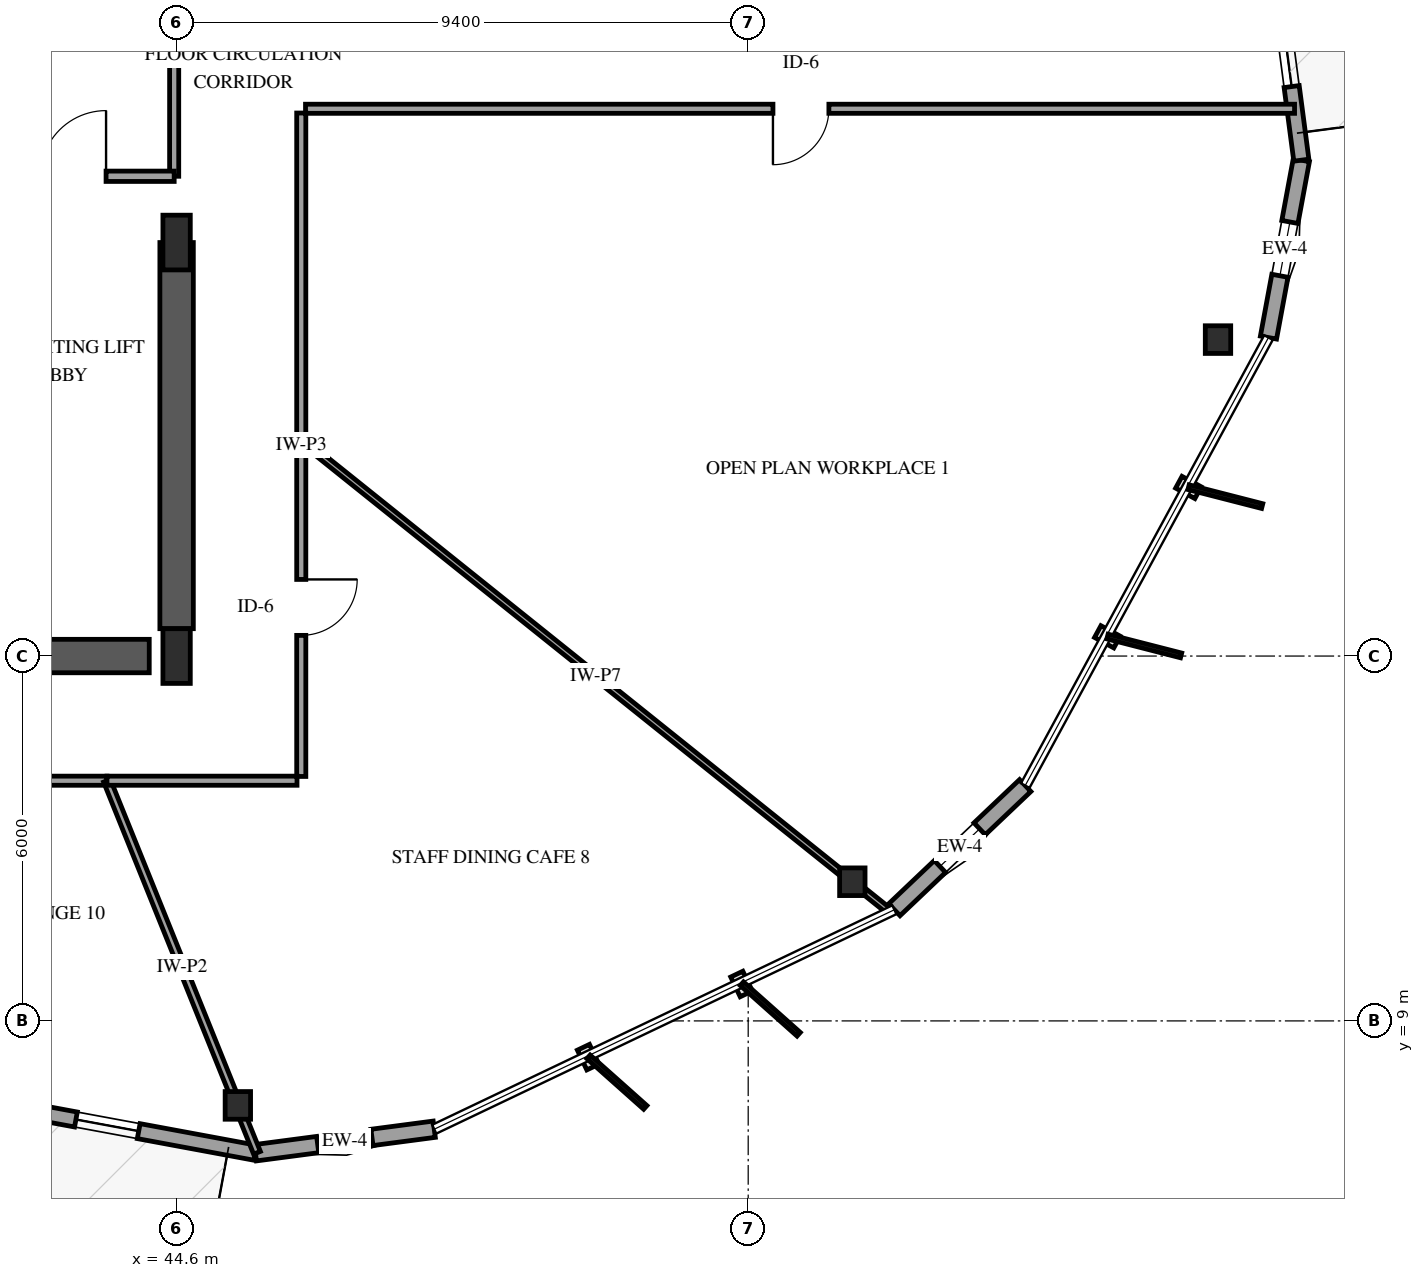
"""IFC4 building model, lengths in metres.
Left out: names, types, materials, properties, quantities, classifications, styles, units other than length and angle.
Written with IfcOpenShell. Run it as: python <this file> out.ifc"""

import sys

from ifc_helpers import new_model, si_unit, direction, frame, frame_2d, origin, origin_2d, place, context, subcontext, project, spatial, rectangle, i_section, extrude, element, fill, save


model = new_model("IFC4")
c1 = context("Model", 3, precision=1e-05, world=origin(), true_north=direction((0.0, 1.0)))
c2 = subcontext(c1, "Body", "Model", "MODEL_VIEW")
j1 = project(units=[si_unit("LENGTHUNIT", "METRE"), si_unit("PLANEANGLEUNIT", "RADIAN")], contexts=[c1])
p1 = place(None, origin())
s1 = spatial("IfcSite", under=j1, at=p1, CompositionType="ELEMENT")
p2 = place(p1, origin())
s2 = spatial("IfcBuilding", under=s1, at=p2, CompositionType="ELEMENT")
p3 = place(p2, frame((0.0, 0.0, 126.4)))
s3 = spatial("IfcBuildingStorey", under=s2, at=p3, CompositionType="ELEMENT", Elevation=126.4)
p4 = place(p3, frame((41.3, 15.0, 0.0), z_axis=(0.0, 0.0, 1.0), x_axis=(1.0, 0.0, 0.0)))
e1 = element("IfcWall", 1, at=p4, inside=s3, PredefinedType="SHEAR", context=c2, shape_type="SweptSolid", body=[
    extrude(rectangle(XDim=2.85, YDim=0.55, at=frame_2d((1.425, 0.0))), origin(), (0.0, 0.0, 1.0), 3.9),
])
p5 = place(p3, frame((44.6, 15.45, 0.0), z_axis=(0.0, 0.0, 1.0), x_axis=(0.0, 1.0, 0.0)))
e2 = element("IfcWall", 2, at=p5, inside=s3, PredefinedType="SHEAR", context=c2, shape_type="SweptSolid", body=[
    extrude(rectangle(XDim=6.35, YDim=0.55, at=frame_2d((3.175, 0.0))), origin(), (0.0, 0.0, 1.0), 3.9),
])
for number, where, z_axis, x_axis in (
    (3, (44.6, 15.0, 0.0), (0.0, 0.0, 1.0), (1.0, 0.0, 0.0)),
    (4, (44.6, 21.8, 0.0), (0.0, 0.0, 1.0), (1.0, 0.0, 0.0)),
):
    element("IfcColumn", number, at=place(p3, frame(where, z_axis=z_axis, x_axis=x_axis)), inside=s3, PredefinedType="PILASTER", context=c2, shape_type="SweptSolid", body=[
        extrude(rectangle(XDim=0.45, YDim=0.9, at=origin_2d()), origin(), (0.0, 0.0, 1.0), 3.9),
    ])
for number, where, z_axis, x_axis in (
    (5, (45.607, 7.611, 0.0), (0.0, 0.0, 1.0), (1.0, 0.0, 0.0)),
    (6, (55.712, 11.289, 0.0), (0.0, 0.0, 1.0), (1.0, 0.0, 0.0)),
    (7, (61.726, 20.204, 0.0), (0.0, 0.0, 1.0), (1.0, 0.0, 0.0)),
):
    element("IfcColumn", number, at=place(p3, frame(where, z_axis=z_axis, x_axis=x_axis)), inside=s3, PredefinedType="COLUMN", context=c2, shape_type="SweptSolid", body=[
        extrude(i_section(OverallWidth=0.418, OverallDepth=0.455, WebThickness=0.042, FlangeThickness=0.068, FilletRadius=0.038, at=origin_2d()), origin(), (0.0, 0.0, 1.0), 3.9),
    ])
p6 = place(p3, frame((45.896, 6.832, 0.0), z_axis=(0.0, 0.0, 1.0), x_axis=(0.991434395997, 0.130605660036, 0.0)))
e8 = element("IfcWall", 8, at=p6, inside=s3, PredefinedType="SOLIDWALL", context=c2, shape_type="SweptSolid", body=[
    extrude(rectangle(XDim=2.967, YDim=0.27, at=frame_2d((1.483, 0.0))), origin(), (0.0, 0.0, 1.0), 2.979),
])
p7 = place(p6, frame((1.033, 0.0, 0.75)))
e9 = element("IfcOpeningElement", 9, at=p7, cuts=e8, PredefinedType="OPENING", context=c2, shape_type="SweptSolid", body=[
    extrude(rectangle(XDim=0.9, YDim=1.5, at=frame_2d((0.45, 0.75))), frame((0.0, 0.145, 0.0), z_axis=(0.0, -1.0, 0.0), x_axis=(1.0, 0.0, 0.0)), (0.0, 0.0, 1.0), 0.29),
])
p8 = place(p3, frame((37.653, 8.359, 0.0), z_axis=(0.0, 0.0, 1.0), x_axis=(0.983253798772, -0.182241507899, 0.0)))
e10 = element("IfcWall", 10, at=p8, inside=s3, PredefinedType="SOLIDWALL", context=c2, shape_type="SweptSolid", body=[
    extrude(rectangle(XDim=8.384, YDim=0.25, at=frame_2d((4.192, 0.0))), origin(), (0.0, 0.0, 1.0), 2.979),
])
p9 = place(p8, frame((3.692, 0.0, 0.0)))
e11 = element("IfcOpeningElement", 11, at=p9, cuts=e10, PredefinedType="OPENING", context=c2, shape_type="SweptSolid", body=[
    extrude(rectangle(XDim=1.05, YDim=2.15, at=frame_2d((0.525, 1.075))), frame((0.0, 0.135, 0.0), z_axis=(0.0, -1.0, 0.0), x_axis=(1.0, 0.0, 0.0)), (0.0, 0.0, 1.0), 0.27),
])
p10 = place(p8, frame((0.44, 0.0, 0.72)))
e12 = element("IfcOpeningElement", 12, at=p10, cuts=e10, PredefinedType="OPENING", context=c2, shape_type="SweptSolid", body=[
    extrude(rectangle(XDim=1.05, YDim=1.55, at=frame_2d((0.525, 0.775))), frame((0.0, 0.135, 0.0), z_axis=(0.0, -1.0, 0.0), x_axis=(1.0, 0.0, 0.0)), (0.0, 0.0, 1.0), 0.27),
])
p11 = place(p8, frame((5.382, 0.0, 0.72)))
e13 = element("IfcOpeningElement", 13, at=p11, cuts=e10, PredefinedType="OPENING", context=c2, shape_type="SweptSolid", body=[
    extrude(rectangle(XDim=1.05, YDim=1.55, at=frame_2d((0.525, 0.775))), frame((0.0, 0.135, 0.0), z_axis=(0.0, -1.0, 0.0), x_axis=(1.0, 0.0, 0.0)), (0.0, 0.0, 1.0), 0.27),
])
p12 = place(p3, frame((56.404, 10.828, 0.0), z_axis=(0.0, 0.0, 1.0), x_axis=(0.725340416539, 0.688390354476, 0.0)))
e14 = element("IfcWall", 14, at=p12, inside=s3, PredefinedType="SOLIDWALL", context=c2, shape_type="SweptSolid", body=[
    extrude(rectangle(XDim=2.967, YDim=0.27, at=frame_2d((1.483, 0.0))), origin(), (0.0, 0.0, 1.0), 2.979),
])
p13 = place(p12, frame((1.033, 0.0, 0.75)))
e15 = element("IfcOpeningElement", 15, at=p13, cuts=e14, PredefinedType="OPENING", context=c2, shape_type="SweptSolid", body=[
    extrude(rectangle(XDim=0.9, YDim=1.5, at=frame_2d((0.45, 0.75))), frame((0.0, 0.145, 0.0), z_axis=(0.0, -1.0, 0.0), x_axis=(1.0, 0.0, 0.0)), (0.0, 0.0, 1.0), 0.29),
])
p14 = place(p3, frame((62.556, 20.238, 0.0), z_axis=(0.0, 0.0, 1.0), x_axis=(0.182295553122, 0.983243780205, 0.0)))
e16 = element("IfcWall", 16, at=p14, inside=s3, PredefinedType="SOLIDWALL", context=c2, shape_type="SweptSolid", body=[
    extrude(rectangle(XDim=2.967, YDim=0.27, at=frame_2d((1.483, 0.0))), origin(), (0.0, 0.0, 1.0), 2.979),
])
p15 = place(p14, frame((1.033, 0.0, 0.75)))
e17 = element("IfcOpeningElement", 17, at=p15, cuts=e16, PredefinedType="OPENING", context=c2, shape_type="SweptSolid", body=[
    extrude(rectangle(XDim=0.9, YDim=1.5, at=frame_2d((0.45, 0.75))), frame((0.0, 0.145, 0.0), z_axis=(0.0, -1.0, 0.0), x_axis=(1.0, 0.0, 0.0)), (0.0, 0.0, 1.0), 0.29),
])
p16 = place(p3, frame((63.097, 23.155, 0.0), z_axis=(0.0, 0.0, 1.0), x_axis=(-0.130551689343, 0.99144150428, 0.0)))
e18 = element("IfcWall", 18, at=p16, inside=s3, PredefinedType="SOLIDWALL", context=c2, shape_type="SweptSolid", body=[
    extrude(rectangle(XDim=8.384, YDim=0.25, at=frame_2d((4.192, 0.0))), origin(), (0.0, 0.0, 1.0), 2.979),
])
p17 = place(p16, frame((3.692, 0.0, 0.0)))
e19 = element("IfcOpeningElement", 19, at=p17, cuts=e18, PredefinedType="OPENING", context=c2, shape_type="SweptSolid", body=[
    extrude(rectangle(XDim=1.05, YDim=2.15, at=frame_2d((0.525, 1.075))), frame((0.0, 0.135, 0.0), z_axis=(0.0, -1.0, 0.0), x_axis=(1.0, 0.0, 0.0)), (0.0, 0.0, 1.0), 0.27),
])
p18 = place(p16, frame((1.221, 0.0, 0.72)))
e20 = element("IfcOpeningElement", 20, at=p18, cuts=e18, PredefinedType="OPENING", context=c2, shape_type="SweptSolid", body=[
    extrude(rectangle(XDim=1.05, YDim=1.55, at=frame_2d((0.525, 0.775))), frame((0.0, 0.135, 0.0), z_axis=(0.0, -1.0, 0.0), x_axis=(1.0, 0.0, 0.0)), (0.0, 0.0, 1.0), 0.27),
])
p19 = place(p16, frame((5.382, 0.0, 0.72)))
e21 = element("IfcOpeningElement", 21, at=p19, cuts=e18, PredefinedType="OPENING", context=c2, shape_type="SweptSolid", body=[
    extrude(rectangle(XDim=1.05, YDim=1.55, at=frame_2d((0.525, 0.775))), frame((0.0, 0.135, 0.0), z_axis=(0.0, -1.0, 0.0), x_axis=(1.0, 0.0, 0.0)), (0.0, 0.0, 1.0), 0.27),
])
p20 = place(p3, frame((62.985, 24.0, 0.0), z_axis=(0.0, 0.0, 1.0), x_axis=(-1.0, 0.0, 0.0)))
e22 = element("IfcWall", 22, at=p20, inside=s3, PredefinedType="PARTITIONING", context=c2, shape_type="SweptSolid", body=[
    extrude(rectangle(XDim=16.265, YDim=0.15, at=frame_2d((8.133, 0.0))), origin(), (0.0, 0.0, 1.0), 3.6),
])
p21 = place(p20, frame((7.658, 0.0, 0.0)))
e23 = element("IfcOpeningElement", 23, at=p21, cuts=e22, PredefinedType="OPENING", context=c2, shape_type="SweptSolid", body=[
    extrude(rectangle(XDim=0.92, YDim=2.12, at=frame_2d((0.46, 1.06))), frame((0.0, 0.085, 0.0), z_axis=(0.0, -1.0, 0.0), x_axis=(1.0, 0.0, 0.0)), (0.0, 0.0, 1.0), 0.17),
])
p22 = place(p3, frame((46.65, 18.55, 0.0), z_axis=(0.0, 0.0, 1.0), x_axis=(0.780390500905, -0.625292464449, 0.0)))
e24 = element("IfcWall", 24, at=p22, inside=s3, PredefinedType="PARTITIONING", context=c2, shape_type="SweptSolid", body=[
    extrude(rectangle(XDim=12.406, YDim=0.1, at=frame_2d((6.203, 0.0))), origin(), (0.0, 0.0, 1.0), 2.978),
])
p23 = place(p3, frame((43.455, 12.95, 0.0), z_axis=(0.0, 0.0, 1.0), x_axis=(-1.0, 0.0, 0.0)))
e25 = element("IfcWall", 25, at=p23, inside=s3, PredefinedType="PARTITIONING", context=c2, shape_type="SweptSolid", body=[
    extrude(rectangle(XDim=7.637, YDim=0.15, at=frame_2d((3.818, 0.0))), origin(), (0.0, 0.0, 1.0), 3.6),
])
p24 = place(p23, frame((3.344, 0.0, 0.0)))
e26 = element("IfcOpeningElement", 26, at=p24, cuts=e25, PredefinedType="OPENING", context=c2, shape_type="SweptSolid", body=[
    extrude(rectangle(XDim=0.92, YDim=2.12, at=frame_2d((0.46, 1.06))), frame((0.0, 0.085, 0.0), z_axis=(0.0, -1.0, 0.0), x_axis=(1.0, 0.0, 0.0)), (0.0, 0.0, 1.0), 0.17),
])
p25 = place(p3, frame((44.56, 29.8, 0.0), z_axis=(0.0, 0.0, 1.0), x_axis=(0.0, -1.0, 0.0)))
e27 = element("IfcWall", 27, at=p25, inside=s3, PredefinedType="PARTITIONING", context=c2, shape_type="SweptSolid", body=[
    extrude(rectangle(XDim=6.91, YDim=0.15, at=frame_2d((3.455, 0.0))), origin(), (0.0, 0.0, 1.0), 2.64),
])
p26 = place(p25, frame((2.915, 0.0, 0.0)))
e28 = element("IfcOpeningElement", 28, at=p26, cuts=e27, PredefinedType="OPENING", context=c2, shape_type="SweptSolid", body=[
    extrude(rectangle(XDim=1.08, YDim=2.15, at=frame_2d((0.54, 1.075))), frame((0.0, 0.085, 0.0), z_axis=(0.0, -1.0, 0.0), x_axis=(1.0, 0.0, 0.0)), (0.0, 0.0, 1.0), 0.17),
])
p27 = place(p3, frame((43.455, 12.95, 0.0), z_axis=(0.0, 0.0, 1.0), x_axis=(0.37393496539, -0.927454927023, 0.0)))
e29 = element("IfcWall", 29, at=p27, inside=s3, PredefinedType="PARTITIONING", context=c2, shape_type="SweptSolid", body=[
    extrude(rectangle(XDim=6.597, YDim=0.12, at=frame_2d((3.299, 0.0))), origin(), (0.0, 0.0, 1.0), 2.895),
])
p28 = place(p3, frame((46.65, 18.55, 0.0), z_axis=(0.0, 0.0, 1.0), x_axis=(0.0, -1.0, 0.0)))
e30 = element("IfcWall", 30, at=p28, inside=s3, PredefinedType="PARTITIONING", context=c2, shape_type="SweptSolid", body=[
    extrude(rectangle(XDim=5.53, YDim=0.15, at=frame_2d((2.765, 0.0))), origin(), (0.0, 0.0, 1.0), 3.6),
])
p29 = place(p28, frame((2.29, 0.0, 0.0)))
e31 = element("IfcOpeningElement", 31, at=p29, cuts=e30, PredefinedType="OPENING", context=c2, shape_type="SweptSolid", body=[
    extrude(rectangle(XDim=0.92, YDim=2.12, at=frame_2d((0.46, 1.06))), frame((0.0, 0.085, 0.0), z_axis=(0.0, -1.0, 0.0), x_axis=(1.0, 0.0, 0.0)), (0.0, 0.0, 1.0), 0.17),
])
p30 = place(p3, frame((46.65, 23.93, 0.0), z_axis=(0.0, 0.0, 1.0), x_axis=(0.0, -1.0, 0.0)))
e32 = element("IfcWall", 32, at=p30, inside=s3, PredefinedType="PARTITIONING", context=c2, shape_type="SweptSolid", body=[
    extrude(rectangle(XDim=5.38, YDim=0.15, at=frame_2d((2.69, 0.0))), origin(), (0.0, 0.0, 1.0), 3.6),
])
p31 = place(p3, frame((41.24, 22.89, 0.0), z_axis=(0.0, 0.0, 1.0), x_axis=(1.0, 0.0, 0.0)))
e33 = element("IfcWall", 33, at=p31, inside=s3, PredefinedType="PARTITIONING", context=c2, shape_type="SweptSolid", body=[
    extrude(rectangle(XDim=3.32, YDim=0.17, at=frame_2d((1.66, 0.0))), origin(), (0.0, 0.0, 1.0), 3.6),
])
p32 = place(p31, frame((1.12, 0.0, 0.0)))
e34 = element("IfcOpeningElement", 34, at=p32, cuts=e33, PredefinedType="OPENING", context=c2, shape_type="SweptSolid", body=[
    extrude(rectangle(XDim=1.08, YDim=2.15, at=frame_2d((0.54, 1.075))), frame((0.0, 0.095, 0.0), z_axis=(0.0, -1.0, 0.0), x_axis=(1.0, 0.0, 0.0)), (0.0, 0.0, 1.0), 0.19),
])
p33 = place(p3, frame((46.58, 12.95, 0.0), z_axis=(0.0, 0.0, 1.0), x_axis=(-1.0, 0.0, 0.0)))
e35 = element("IfcWall", 35, at=p33, inside=s3, PredefinedType="PARTITIONING", context=c2, shape_type="SweptSolid", body=[
    extrude(rectangle(XDim=3.125, YDim=0.15, at=frame_2d((1.562, 0.0))), origin(), (0.0, 0.0, 1.0), 3.6),
])
p34 = place(p7, origin())
e36 = element("IfcWindow", 36, at=p34, inside=s3, PartitioningType="SINGLE_PANEL", PredefinedType="WINDOW", context=c2, shape_type="SweptSolid", body=[
    extrude(rectangle(XDim=0.9, YDim=1.5, at=frame_2d((0.45, 0.75))), frame((0.0, 0.03, 0.0), z_axis=(0.0, -1.0, 0.0), x_axis=(1.0, 0.0, 0.0)), (0.0, 0.0, 1.0), 0.06),
])
fill(e9, e36)
p35 = place(p11, origin())
e37 = element("IfcWindow", 37, at=p35, inside=s3, PartitioningType="SINGLE_PANEL", PredefinedType="WINDOW", context=c2, shape_type="SweptSolid", body=[
    extrude(rectangle(XDim=1.05, YDim=1.55, at=frame_2d((0.525, 0.775))), frame((0.0, 0.03, 0.0), z_axis=(0.0, -1.0, 0.0), x_axis=(1.0, 0.0, 0.0)), (0.0, 0.0, 1.0), 0.06),
])
fill(e13, e37)
p36 = place(p13, origin())
e38 = element("IfcWindow", 38, at=p36, inside=s3, PartitioningType="SINGLE_PANEL", PredefinedType="WINDOW", context=c2, shape_type="SweptSolid", body=[
    extrude(rectangle(XDim=0.9, YDim=1.5, at=frame_2d((0.45, 0.75))), frame((0.0, 0.03, 0.0), z_axis=(0.0, -1.0, 0.0), x_axis=(1.0, 0.0, 0.0)), (0.0, 0.0, 1.0), 0.06),
])
fill(e15, e38)
p37 = place(p15, origin())
e39 = element("IfcWindow", 39, at=p37, inside=s3, PartitioningType="SINGLE_PANEL", PredefinedType="WINDOW", context=c2, shape_type="SweptSolid", body=[
    extrude(rectangle(XDim=0.9, YDim=1.5, at=frame_2d((0.45, 0.75))), frame((0.0, 0.03, 0.0), z_axis=(0.0, -1.0, 0.0), x_axis=(1.0, 0.0, 0.0)), (0.0, 0.0, 1.0), 0.06),
])
fill(e17, e39)
p38 = place(p18, origin())
e40 = element("IfcWindow", 40, at=p38, inside=s3, PartitioningType="SINGLE_PANEL", PredefinedType="WINDOW", context=c2, shape_type="SweptSolid", body=[
    extrude(rectangle(XDim=1.05, YDim=1.55, at=frame_2d((0.525, 0.775))), frame((0.0, 0.03, 0.0), z_axis=(0.0, -1.0, 0.0), x_axis=(1.0, 0.0, 0.0)), (0.0, 0.0, 1.0), 0.06),
])
fill(e20, e40)
p39 = place(p21, origin())
e41 = element("IfcDoor", 41, at=p39, inside=s3, OperationType="SINGLE_SWING_RIGHT", PredefinedType="DOOR", context=c2, shape_type="SweptSolid", body=[
    extrude(rectangle(XDim=0.92, YDim=2.12, at=frame_2d((0.46, 1.06))), frame((0.0, 0.025, 0.0), z_axis=(0.0, -1.0, 0.0), x_axis=(1.0, 0.0, 0.0)), (0.0, 0.0, 1.0), 0.05),
])
fill(e23, e41)
p40 = place(p29, origin())
e42 = element("IfcDoor", 42, at=p40, inside=s3, OperationType="SINGLE_SWING_LEFT", PredefinedType="DOOR", context=c2, shape_type="SweptSolid", body=[
    extrude(rectangle(XDim=0.92, YDim=2.12, at=frame_2d((0.46, 1.06))), frame((0.0, 0.025, 0.0), z_axis=(0.0, -1.0, 0.0), x_axis=(1.0, 0.0, 0.0)), (0.0, 0.0, 1.0), 0.05),
])
fill(e31, e42)
p41 = place(p32, origin())
e43 = element("IfcDoor", 43, at=p41, inside=s3, OperationType="SINGLE_SWING_RIGHT", PredefinedType="DOOR", context=c2, shape_type="SweptSolid", body=[
    extrude(rectangle(XDim=1.08, YDim=2.15, at=frame_2d((0.54, 1.075))), frame((0.0, 0.025, 0.0), z_axis=(0.0, -1.0, 0.0), x_axis=(1.0, 0.0, 0.0)), (0.0, 0.0, 1.0), 0.05),
])
fill(e34, e43)
save(model, sys.argv[1])
